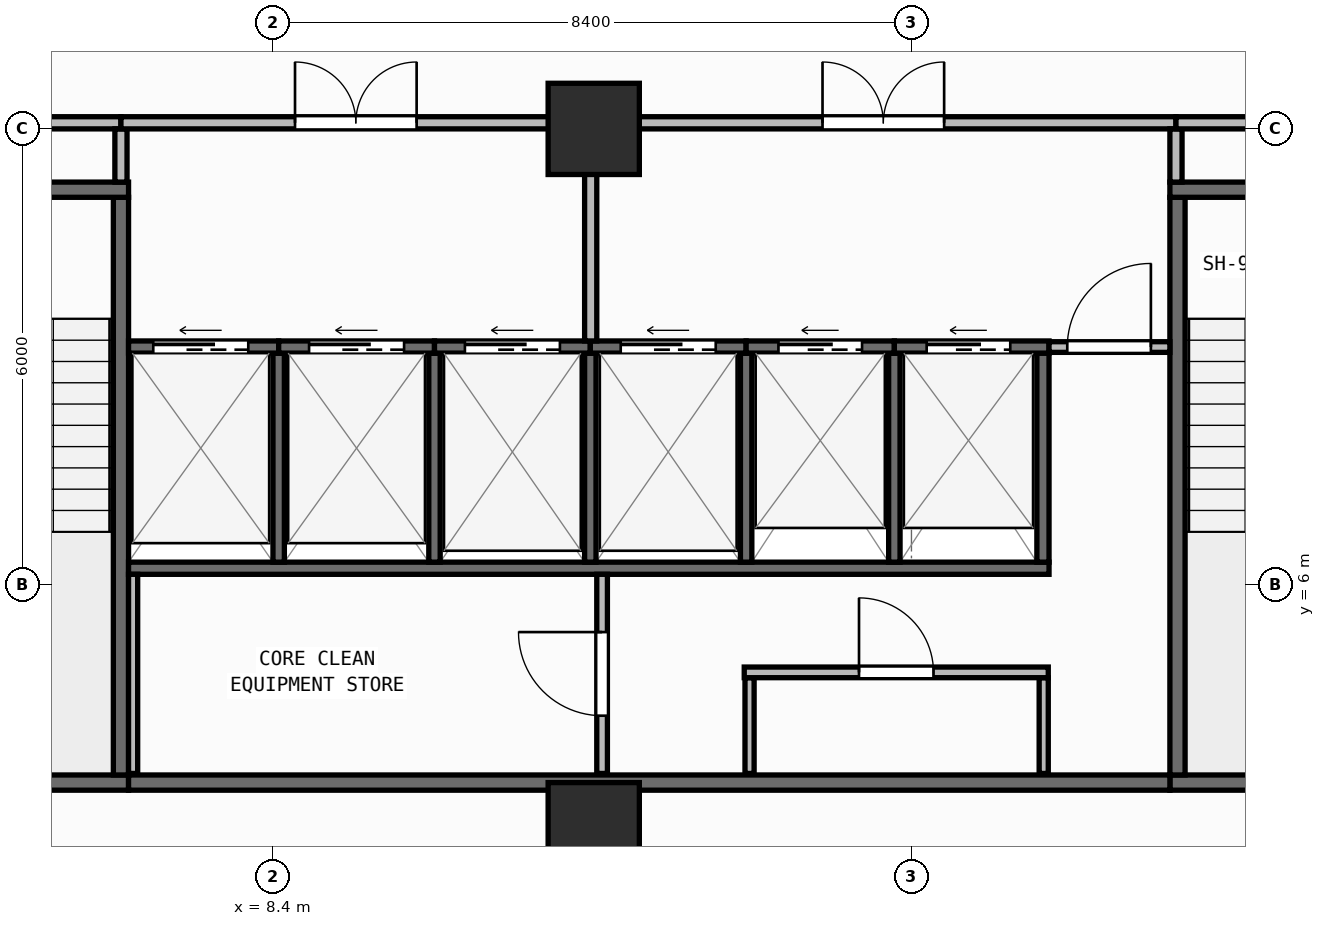
"""IFC4 building model, lengths in metres.
Left out: names, types, materials, properties, quantities, classifications, styles, units other than length and angle.
Written with IfcOpenShell. Run it as: python <this file> out.ifc"""

import sys

from ifc_helpers import new_model, si_unit, direction, frame, frame_2d, origin, origin_2d, place, context, subcontext, project, spatial, rectangle, extrude, element, fill, save


model = new_model("IFC4")
c1 = context("Model", 3, precision=1e-05, world=origin(), true_north=direction((0.0, 1.0)))
c2 = subcontext(c1, "Body", "Model", "MODEL_VIEW")
j1 = project(units=[si_unit("LENGTHUNIT", "METRE"), si_unit("PLANEANGLEUNIT", "RADIAN")], contexts=[c1])
p1 = place(None, origin())
s1 = spatial("IfcSite", under=j1, at=p1, CompositionType="ELEMENT")
p2 = place(p1, origin())
s2 = spatial("IfcBuilding", under=s1, at=p2, CompositionType="ELEMENT")
p3 = place(p2, frame((0.0, 0.0, 103.35)))
s3 = spatial("IfcBuildingStorey", under=s2, at=p3, CompositionType="ELEMENT", Elevation=103.35)
for number, where, z_axis, x_axis in (
    (1, (12.62, 2.8, 0.0), (0.0, 0.0, 1.0), (1.0, 0.0, 0.0)),
    (2, (12.62, 12.0, 0.0), (0.0, 0.0, 1.0), (1.0, 0.0, 0.0)),
):
    element("IfcColumn", number, at=place(p3, frame(where, z_axis=z_axis, x_axis=x_axis)), inside=s3, PredefinedType="COLUMN", context=c2, shape_type="SweptSolid", body=[
        extrude(rectangle(XDim=1.2, YDim=1.2, at=origin_2d()), origin(), (0.0, 0.0, 1.0), 3.95),
    ])
p4 = place(p3, frame((2.76, 0.173, 0.0), z_axis=(0.0, 0.0, 1.0), x_axis=(0.996857931723, 0.079210251617, 0.0)))
e3 = element("IfcWall", 3, at=p4, inside=s3, PredefinedType="STANDARD", context=c2, shape_type="SweptSolid", body=[
    extrude(rectangle(XDim=51.442, YDim=0.26, at=frame_2d((25.721, 0.0))), origin(), (0.0, 0.0, 1.0), 3.71),
])
p5 = place(p4, frame((24.521, 0.0, 0.9)))
e4 = element("IfcOpeningElement", 4, at=p5, cuts=e3, PredefinedType="OPENING", context=c2, shape_type="SweptSolid", body=[
    extrude(rectangle(XDim=2.4, YDim=1.65, at=frame_2d((1.2, 0.825))), frame((0.0, 0.14, 0.0), z_axis=(0.0, -1.0, 0.0), x_axis=(1.0, 0.0, 0.0)), (0.0, 0.0, 1.0), 0.28),
])
p6 = place(p3, frame((2.8, 3.4, 0.0), z_axis=(0.0, 0.0, 1.0), x_axis=(1.0, 0.0, 0.0)))
e5 = element("IfcWall", 5, at=p6, inside=s3, PredefinedType="SHEAR", context=c2, shape_type="SweptSolid", body=[
    extrude(rectangle(XDim=3.7, YDim=0.2, at=frame_2d((1.85, 0.0))), origin(), (0.0, 0.0, 1.0), 3.71),
])
p7 = place(p3, frame((6.4, 3.5, 0.0), z_axis=(0.0, 0.0, 1.0), x_axis=(0.0, 1.0, 0.0)))
e6 = element("IfcWall", 6, at=p7, inside=s3, PredefinedType="SHEAR", context=c2, shape_type="SweptSolid", body=[
    extrude(rectangle(XDim=7.6, YDim=0.2, at=frame_2d((3.8, 0.0))), origin(), (0.0, 0.0, 1.0), 3.71),
])
p8 = place(p3, frame((2.8, 11.2, 0.0), z_axis=(0.0, 0.0, 1.0), x_axis=(1.0, 0.0, 0.0)))
e7 = element("IfcWall", 7, at=p8, inside=s3, PredefinedType="SHEAR", context=c2, shape_type="SweptSolid", body=[
    extrude(rectangle(XDim=3.7, YDim=0.2, at=frame_2d((1.85, 0.0))), origin(), (0.0, 0.0, 1.0), 3.71),
])
p9 = place(p8, frame((1.2, 0.0, 0.0)))
e8 = element("IfcOpeningElement", 8, at=p9, cuts=e7, PredefinedType="OPENING", context=c2, shape_type="SweptSolid", body=[
    extrude(rectangle(XDim=1.3, YDim=2.15, at=frame_2d((0.65, 1.075))), frame((0.0, 0.11, 0.0), z_axis=(0.0, -1.0, 0.0), x_axis=(1.0, 0.0, 0.0)), (0.0, 0.0, 1.0), 0.22),
])
p10 = place(p3, frame((20.2, 3.4, 0.0), z_axis=(0.0, 0.0, 1.0), x_axis=(1.0, 0.0, 0.0)))
e9 = element("IfcWall", 9, at=p10, inside=s3, PredefinedType="SHEAR", context=c2, shape_type="SweptSolid", body=[
    extrude(rectangle(XDim=3.7, YDim=0.2, at=frame_2d((1.85, 0.0))), origin(), (0.0, 0.0, 1.0), 3.71),
])
p11 = place(p3, frame((20.3, 3.5, 0.0), z_axis=(0.0, 0.0, 1.0), x_axis=(0.0, 1.0, 0.0)))
e10 = element("IfcWall", 10, at=p11, inside=s3, PredefinedType="SHEAR", context=c2, shape_type="SweptSolid", body=[
    extrude(rectangle(XDim=7.6, YDim=0.2, at=frame_2d((3.8, 0.0))), origin(), (0.0, 0.0, 1.0), 3.71),
])
p12 = place(p3, frame((20.2, 11.2, 0.0), z_axis=(0.0, 0.0, 1.0), x_axis=(1.0, 0.0, 0.0)))
e11 = element("IfcWall", 11, at=p12, inside=s3, PredefinedType="SHEAR", context=c2, shape_type="SweptSolid", body=[
    extrude(rectangle(XDim=3.7, YDim=0.2, at=frame_2d((1.85, 0.0))), origin(), (0.0, 0.0, 1.0), 3.71),
])
p13 = place(p12, frame((1.2, 0.0, 0.0)))
e12 = element("IfcOpeningElement", 12, at=p13, cuts=e11, PredefinedType="OPENING", context=c2, shape_type="SweptSolid", body=[
    extrude(rectangle(XDim=1.3, YDim=2.15, at=frame_2d((0.65, 1.075))), frame((0.0, 0.11, 0.0), z_axis=(0.0, -1.0, 0.0), x_axis=(1.0, 0.0, 0.0)), (0.0, 0.0, 1.0), 0.22),
])
p14 = place(p3, frame((6.5, 3.4, 0.0), z_axis=(0.0, 0.0, 1.0), x_axis=(1.0, 0.0, 0.0)))
e13 = element("IfcWall", 13, at=p14, inside=s3, PredefinedType="SHEAR", context=c2, shape_type="SweptSolid", body=[
    extrude(rectangle(XDim=13.7, YDim=0.2, at=frame_2d((6.85, 0.0))), origin(), (0.0, 0.0, 1.0), 3.71),
])
p15 = place(p3, frame((6.5, 6.22, 0.0), z_axis=(0.0, 0.0, 1.0), x_axis=(1.0, 0.0, 0.0)))
e14 = element("IfcWall", 14, at=p15, inside=s3, PredefinedType="SHEAR", context=c2, shape_type="SweptSolid", body=[
    extrude(rectangle(XDim=12.11, YDim=0.16, at=frame_2d((6.055, 0.0))), origin(), (0.0, 0.0, 1.0), 3.71),
])
p16 = place(p3, frame((18.53, 6.3, 0.0), z_axis=(0.0, 0.0, 1.0), x_axis=(0.0, 1.0, 0.0)))
e15 = element("IfcWall", 15, at=p16, inside=s3, PredefinedType="SHEAR", context=c2, shape_type="SweptSolid", body=[
    extrude(rectangle(XDim=2.75, YDim=0.16, at=frame_2d((1.375, 0.0))), origin(), (0.0, 0.0, 1.0), 3.71),
])
for number, where, z_axis, x_axis in (
    (16, (8.475, 6.3, 0.0), (0.0, 0.0, 1.0), (0.0, 1.0, 0.0)),
    (17, (10.525, 6.3, 0.0), (0.0, 0.0, 1.0), (0.0, 1.0, 0.0)),
    (18, (12.575, 6.3, 0.0), (0.0, 0.0, 1.0), (0.0, 1.0, 0.0)),
    (19, (14.625, 6.3, 0.0), (0.0, 0.0, 1.0), (0.0, 1.0, 0.0)),
    (20, (16.575, 6.3, 0.0), (0.0, 0.0, 1.0), (0.0, 1.0, 0.0)),
):
    element("IfcWall", number, at=place(p3, frame(where, z_axis=z_axis, x_axis=x_axis)), inside=s3, PredefinedType="SHEAR", context=c2, shape_type="SweptSolid", body=[
        extrude(rectangle(XDim=2.75, YDim=0.15, at=frame_2d((1.375, 0.0))), origin(), (0.0, 0.0, 1.0), 3.71),
    ])
p17 = place(p3, frame((6.5, 9.13, 0.0), z_axis=(0.0, 0.0, 1.0), x_axis=(1.0, 0.0, 0.0)))
e21 = element("IfcWall", 21, at=p17, inside=s3, PredefinedType="SHEAR", context=c2, shape_type="SweptSolid", body=[
    extrude(rectangle(XDim=1.975, YDim=0.16, at=frame_2d((0.988, 0.0))), origin(), (0.0, 0.0, 1.0), 3.71),
])
p18 = place(p17, frame((0.325, 0.0, 0.0)))
e22 = element("IfcOpeningElement", 22, at=p18, cuts=e21, PredefinedType="OPENING", context=c2, shape_type="SweptSolid", body=[
    extrude(rectangle(XDim=1.25, YDim=2.15, at=frame_2d((0.625, 1.075))), frame((0.0, 0.09, 0.0), z_axis=(0.0, -1.0, 0.0), x_axis=(1.0, 0.0, 0.0)), (0.0, 0.0, 1.0), 0.18),
])
p19 = place(p3, frame((8.475, 9.13, 0.0), z_axis=(0.0, 0.0, 1.0), x_axis=(1.0, 0.0, 0.0)))
e23 = element("IfcWall", 23, at=p19, inside=s3, PredefinedType="SHEAR", context=c2, shape_type="SweptSolid", body=[
    extrude(rectangle(XDim=2.05, YDim=0.16, at=frame_2d((1.025, 0.0))), origin(), (0.0, 0.0, 1.0), 3.71),
])
p20 = place(p19, frame((0.4, 0.0, 0.0)))
e24 = element("IfcOpeningElement", 24, at=p20, cuts=e23, PredefinedType="OPENING", context=c2, shape_type="SweptSolid", body=[
    extrude(rectangle(XDim=1.25, YDim=2.15, at=frame_2d((0.625, 1.075))), frame((0.0, 0.09, 0.0), z_axis=(0.0, -1.0, 0.0), x_axis=(1.0, 0.0, 0.0)), (0.0, 0.0, 1.0), 0.18),
])
p21 = place(p3, frame((10.525, 9.13, 0.0), z_axis=(0.0, 0.0, 1.0), x_axis=(1.0, 0.0, 0.0)))
e25 = element("IfcWall", 25, at=p21, inside=s3, PredefinedType="SHEAR", context=c2, shape_type="SweptSolid", body=[
    extrude(rectangle(XDim=2.05, YDim=0.16, at=frame_2d((1.025, 0.0))), origin(), (0.0, 0.0, 1.0), 3.71),
])
p22 = place(p21, frame((0.4, 0.0, 0.0)))
e26 = element("IfcOpeningElement", 26, at=p22, cuts=e25, PredefinedType="OPENING", context=c2, shape_type="SweptSolid", body=[
    extrude(rectangle(XDim=1.25, YDim=2.15, at=frame_2d((0.625, 1.075))), frame((0.0, 0.09, 0.0), z_axis=(0.0, -1.0, 0.0), x_axis=(1.0, 0.0, 0.0)), (0.0, 0.0, 1.0), 0.18),
])
p23 = place(p3, frame((12.575, 9.13, 0.0), z_axis=(0.0, 0.0, 1.0), x_axis=(1.0, 0.0, 0.0)))
e27 = element("IfcWall", 27, at=p23, inside=s3, PredefinedType="SHEAR", context=c2, shape_type="SweptSolid", body=[
    extrude(rectangle(XDim=2.05, YDim=0.16, at=frame_2d((1.025, 0.0))), origin(), (0.0, 0.0, 1.0), 3.71),
])
p24 = place(p23, frame((0.4, 0.0, 0.0)))
e28 = element("IfcOpeningElement", 28, at=p24, cuts=e27, PredefinedType="OPENING", context=c2, shape_type="SweptSolid", body=[
    extrude(rectangle(XDim=1.25, YDim=2.15, at=frame_2d((0.625, 1.075))), frame((0.0, 0.09, 0.0), z_axis=(0.0, -1.0, 0.0), x_axis=(1.0, 0.0, 0.0)), (0.0, 0.0, 1.0), 0.18),
])
p25 = place(p3, frame((14.625, 9.13, 0.0), z_axis=(0.0, 0.0, 1.0), x_axis=(1.0, 0.0, 0.0)))
e29 = element("IfcWall", 29, at=p25, inside=s3, PredefinedType="SHEAR", context=c2, shape_type="SweptSolid", body=[
    extrude(rectangle(XDim=1.95, YDim=0.16, at=frame_2d((0.975, 0.0))), origin(), (0.0, 0.0, 1.0), 3.71),
])
p26 = place(p25, frame((0.425, 0.0, 0.0)))
e30 = element("IfcOpeningElement", 30, at=p26, cuts=e29, PredefinedType="OPENING", context=c2, shape_type="SweptSolid", body=[
    extrude(rectangle(XDim=1.1, YDim=2.15, at=frame_2d((0.55, 1.075))), frame((0.0, 0.09, 0.0), z_axis=(0.0, -1.0, 0.0), x_axis=(1.0, 0.0, 0.0)), (0.0, 0.0, 1.0), 0.18),
])
p27 = place(p3, frame((16.575, 9.13, 0.0), z_axis=(0.0, 0.0, 1.0), x_axis=(1.0, 0.0, 0.0)))
e31 = element("IfcWall", 31, at=p27, inside=s3, PredefinedType="SHEAR", context=c2, shape_type="SweptSolid", body=[
    extrude(rectangle(XDim=2.035, YDim=0.16, at=frame_2d((1.018, 0.0))), origin(), (0.0, 0.0, 1.0), 3.71),
])
p28 = place(p27, frame((0.425, 0.0, 0.0)))
e32 = element("IfcOpeningElement", 32, at=p28, cuts=e31, PredefinedType="OPENING", context=c2, shape_type="SweptSolid", body=[
    extrude(rectangle(XDim=1.1, YDim=2.15, at=frame_2d((0.55, 1.075))), frame((0.0, 0.09, 0.0), z_axis=(0.0, -1.0, 0.0), x_axis=(1.0, 0.0, 0.0)), (0.0, 0.0, 1.0), 0.18),
])
p29 = place(p3, frame((6.56, 3.52, 0.0), z_axis=(0.0, 0.0, 1.0), x_axis=(0.0, 1.0, 0.0)))
e33 = element("IfcWall", 33, at=p29, inside=s3, PredefinedType="PARTITIONING", context=c2, shape_type="SweptSolid", body=[
    extrude(rectangle(XDim=2.62, YDim=0.12, at=frame_2d((1.31, 0.0))), origin(), (0.0, 0.0, 1.0), 3.71),
])
p30 = place(p3, frame((12.73, 3.52, 0.0), z_axis=(0.0, 0.0, 1.0), x_axis=(0.0, 1.0, 0.0)))
e34 = element("IfcWall", 34, at=p30, inside=s3, PredefinedType="PARTITIONING", context=c2, shape_type="SweptSolid", body=[
    extrude(rectangle(XDim=2.62, YDim=0.14, at=frame_2d((1.31, 0.0))), origin(), (0.0, 0.0, 1.0), 3.71),
])
p31 = place(p30, frame((0.76, 0.0, 0.0)))
e35 = element("IfcOpeningElement", 35, at=p31, cuts=e34, PredefinedType="OPENING", context=c2, shape_type="SweptSolid", body=[
    extrude(rectangle(XDim=1.1, YDim=2.1, at=frame_2d((0.55, 1.05))), frame((0.0, 0.08, 0.0), z_axis=(0.0, -1.0, 0.0), x_axis=(1.0, 0.0, 0.0)), (0.0, 0.0, 1.0), 0.16),
])
for number, where, z_axis, x_axis in (
    (36, (14.67, 3.52, 0.0), (0.0, 0.0, 1.0), (0.0, 1.0, 0.0)),
    (37, (18.54, 3.52, 0.0), (0.0, 0.0, 1.0), (0.0, 1.0, 0.0)),
):
    element("IfcWall", number, at=place(p3, frame(where, z_axis=z_axis, x_axis=x_axis)), inside=s3, PredefinedType="PARTITIONING", context=c2, shape_type="SweptSolid", body=[
        extrude(rectangle(XDim=1.26, YDim=0.12, at=frame_2d((0.63, 0.0))), origin(), (0.0, 0.0, 1.0), 3.71),
    ])
p32 = place(p3, frame((14.6, 4.85, 0.0), z_axis=(0.0, 0.0, 1.0), x_axis=(1.0, 0.0, 0.0)))
e38 = element("IfcWall", 38, at=p32, inside=s3, PredefinedType="PARTITIONING", context=c2, shape_type="SweptSolid", body=[
    extrude(rectangle(XDim=4.0, YDim=0.14, at=frame_2d((2.0, 0.0))), origin(), (0.0, 0.0, 1.0), 3.71),
])
p33 = place(p32, frame((1.51, 0.0, 0.0)))
e39 = element("IfcOpeningElement", 39, at=p33, cuts=e38, PredefinedType="OPENING", context=c2, shape_type="SweptSolid", body=[
    extrude(rectangle(XDim=0.98, YDim=2.1, at=frame_2d((0.49, 1.05))), frame((0.0, 0.08, 0.0), z_axis=(0.0, -1.0, 0.0), x_axis=(1.0, 0.0, 0.0)), (0.0, 0.0, 1.0), 0.16),
])
p34 = place(p3, frame((18.61, 9.13, 0.0), z_axis=(0.0, 0.0, 1.0), x_axis=(1.0, 0.0, 0.0)))
e40 = element("IfcWall", 40, at=p34, inside=s3, PredefinedType="PARTITIONING", context=c2, shape_type="SweptSolid", body=[
    extrude(rectangle(XDim=1.59, YDim=0.14, at=frame_2d((0.795, 0.0))), origin(), (0.0, 0.0, 1.0), 3.71),
])
p35 = place(p34, frame((0.24, 0.0, 0.0)))
e41 = element("IfcOpeningElement", 41, at=p35, cuts=e40, PredefinedType="OPENING", context=c2, shape_type="SweptSolid", body=[
    extrude(rectangle(XDim=1.1, YDim=2.1, at=frame_2d((0.55, 1.05))), frame((0.0, 0.08, 0.0), z_axis=(0.0, -1.0, 0.0), x_axis=(1.0, 0.0, 0.0)), (0.0, 0.0, 1.0), 0.16),
])
p36 = place(p3, frame((2.8, 12.08, 0.0), z_axis=(0.0, 0.0, 1.0), x_axis=(1.0, 0.0, 0.0)))
e42 = element("IfcWall", 42, at=p36, inside=s3, PredefinedType="PARTITIONING", context=c2, shape_type="SweptSolid", body=[
    extrude(rectangle(XDim=3.6, YDim=0.16, at=frame_2d((1.8, 0.0))), origin(), (0.0, 0.0, 1.0), 3.083),
])
p37 = place(p36, frame((1.0, 0.0, 0.0)))
e43 = element("IfcOpeningElement", 43, at=p37, cuts=e42, PredefinedType="OPENING", context=c2, shape_type="SweptSolid", body=[
    extrude(rectangle(XDim=1.6, YDim=2.05, at=frame_2d((0.8, 1.025))), frame((0.0, 0.09, 0.0), z_axis=(0.0, -1.0, 0.0), x_axis=(1.0, 0.0, 0.0)), (0.0, 0.0, 1.0), 0.18),
])
p38 = place(p3, frame((6.4, 11.3, 0.0), z_axis=(0.0, 0.0, 1.0), x_axis=(0.0, 1.0, 0.0)))
e44 = element("IfcWall", 44, at=p38, inside=s3, PredefinedType="PARTITIONING", context=c2, shape_type="SweptSolid", body=[
    extrude(rectangle(XDim=0.7, YDim=0.16, at=frame_2d((0.35, 0.0))), origin(), (0.0, 0.0, 1.0), 3.71),
])
p39 = place(p3, frame((6.4, 12.08, 0.0), z_axis=(0.0, 0.0, 1.0), x_axis=(1.0, 0.0, 0.0)))
e45 = element("IfcWall", 45, at=p39, inside=s3, PredefinedType="PARTITIONING", context=c2, shape_type="SweptSolid", body=[
    extrude(rectangle(XDim=6.18, YDim=0.16, at=frame_2d((3.09, 0.0))), origin(), (0.0, 0.0, 1.0), 3.083),
])
p40 = place(p39, frame((2.29, 0.0, 0.0)))
e46 = element("IfcOpeningElement", 46, at=p40, cuts=e45, PredefinedType="OPENING", context=c2, shape_type="SweptSolid", body=[
    extrude(rectangle(XDim=1.6, YDim=2.05, at=frame_2d((0.8, 1.025))), frame((0.0, 0.09, 0.0), z_axis=(0.0, -1.0, 0.0), x_axis=(1.0, 0.0, 0.0)), (0.0, 0.0, 1.0), 0.18),
])
p41 = place(p3, frame((12.58, 9.21, 0.0), z_axis=(0.0, 0.0, 1.0), x_axis=(0.0, 1.0, 0.0)))
e47 = element("IfcWall", 47, at=p41, inside=s3, PredefinedType="PARTITIONING", context=c2, shape_type="SweptSolid", body=[
    extrude(rectangle(XDim=2.79, YDim=0.16, at=frame_2d((1.395, 0.0))), origin(), (0.0, 0.0, 1.0), 3.71),
])
p42 = place(p3, frame((12.58, 12.08, 0.0), z_axis=(0.0, 0.0, 1.0), x_axis=(1.0, 0.0, 0.0)))
e48 = element("IfcWall", 48, at=p42, inside=s3, PredefinedType="PARTITIONING", context=c2, shape_type="SweptSolid", body=[
    extrude(rectangle(XDim=7.7, YDim=0.16, at=frame_2d((3.85, 0.0))), origin(), (0.0, 0.0, 1.0), 3.083),
])
p43 = place(p42, frame((3.05, 0.0, 0.0)))
e49 = element("IfcOpeningElement", 49, at=p43, cuts=e48, PredefinedType="OPENING", context=c2, shape_type="SweptSolid", body=[
    extrude(rectangle(XDim=1.6, YDim=2.05, at=frame_2d((0.8, 1.025))), frame((0.0, 0.09, 0.0), z_axis=(0.0, -1.0, 0.0), x_axis=(1.0, 0.0, 0.0)), (0.0, 0.0, 1.0), 0.18),
])
p44 = place(p3, frame((20.28, 11.3, 0.0), z_axis=(0.0, 0.0, 1.0), x_axis=(0.0, 1.0, 0.0)))
e50 = element("IfcWall", 50, at=p44, inside=s3, PredefinedType="PARTITIONING", context=c2, shape_type="SweptSolid", body=[
    extrude(rectangle(XDim=0.7, YDim=0.16, at=frame_2d((0.35, 0.0))), origin(), (0.0, 0.0, 1.0), 3.71),
])
p45 = place(p3, frame((20.28, 12.08, 0.0), z_axis=(0.0, 0.0, 1.0), x_axis=(1.0, 0.0, 0.0)))
e51 = element("IfcWall", 51, at=p45, inside=s3, PredefinedType="PARTITIONING", context=c2, shape_type="SweptSolid", body=[
    extrude(rectangle(XDim=3.62, YDim=0.16, at=frame_2d((1.81, 0.0))), origin(), (0.0, 0.0, 1.0), 3.083),
])
p46 = place(p45, frame((1.01, 0.0, 0.0)))
e52 = element("IfcOpeningElement", 52, at=p46, cuts=e51, PredefinedType="OPENING", context=c2, shape_type="SweptSolid", body=[
    extrude(rectangle(XDim=1.6, YDim=2.05, at=frame_2d((0.8, 1.025))), frame((0.0, 0.09, 0.0), z_axis=(0.0, -1.0, 0.0), x_axis=(1.0, 0.0, 0.0)), (0.0, 0.0, 1.0), 0.18),
])
p47 = place(p18, origin())
e53 = element("IfcDoor", 53, at=p47, inside=s3, OperationType="SLIDING_TO_LEFT", PredefinedType="DOOR", context=c2, shape_type="SweptSolid", body=[
    extrude(rectangle(XDim=1.25, YDim=2.15, at=frame_2d((0.625, 1.075))), frame((0.0, 0.025, 0.0), z_axis=(0.0, -1.0, 0.0), x_axis=(1.0, 0.0, 0.0)), (0.0, 0.0, 1.0), 0.05),
])
fill(e22, e53)
p48 = place(p20, origin())
e54 = element("IfcDoor", 54, at=p48, inside=s3, OperationType="SLIDING_TO_LEFT", PredefinedType="DOOR", context=c2, shape_type="SweptSolid", body=[
    extrude(rectangle(XDim=1.25, YDim=2.15, at=frame_2d((0.625, 1.075))), frame((0.0, 0.025, 0.0), z_axis=(0.0, -1.0, 0.0), x_axis=(1.0, 0.0, 0.0)), (0.0, 0.0, 1.0), 0.05),
])
fill(e24, e54)
p49 = place(p22, origin())
e55 = element("IfcDoor", 55, at=p49, inside=s3, OperationType="SLIDING_TO_LEFT", PredefinedType="DOOR", context=c2, shape_type="SweptSolid", body=[
    extrude(rectangle(XDim=1.25, YDim=2.15, at=frame_2d((0.625, 1.075))), frame((0.0, 0.025, 0.0), z_axis=(0.0, -1.0, 0.0), x_axis=(1.0, 0.0, 0.0)), (0.0, 0.0, 1.0), 0.05),
])
fill(e26, e55)
p50 = place(p24, origin())
e56 = element("IfcDoor", 56, at=p50, inside=s3, OperationType="SLIDING_TO_LEFT", PredefinedType="DOOR", context=c2, shape_type="SweptSolid", body=[
    extrude(rectangle(XDim=1.25, YDim=2.15, at=frame_2d((0.625, 1.075))), frame((0.0, 0.025, 0.0), z_axis=(0.0, -1.0, 0.0), x_axis=(1.0, 0.0, 0.0)), (0.0, 0.0, 1.0), 0.05),
])
fill(e28, e56)
p51 = place(p26, origin())
e57 = element("IfcDoor", 57, at=p51, inside=s3, OperationType="SLIDING_TO_LEFT", PredefinedType="DOOR", context=c2, shape_type="SweptSolid", body=[
    extrude(rectangle(XDim=1.1, YDim=2.15, at=frame_2d((0.55, 1.075))), frame((0.0, 0.025, 0.0), z_axis=(0.0, -1.0, 0.0), x_axis=(1.0, 0.0, 0.0)), (0.0, 0.0, 1.0), 0.05),
])
fill(e30, e57)
p52 = place(p28, origin())
e58 = element("IfcDoor", 58, at=p52, inside=s3, OperationType="SLIDING_TO_LEFT", PredefinedType="DOOR", context=c2, shape_type="SweptSolid", body=[
    extrude(rectangle(XDim=1.1, YDim=2.15, at=frame_2d((0.55, 1.075))), frame((0.0, 0.025, 0.0), z_axis=(0.0, -1.0, 0.0), x_axis=(1.0, 0.0, 0.0)), (0.0, 0.0, 1.0), 0.05),
])
fill(e32, e58)
p53 = place(p31, origin())
e59 = element("IfcDoor", 59, at=p53, inside=s3, OperationType="SINGLE_SWING_RIGHT", PredefinedType="DOOR", context=c2, shape_type="SweptSolid", body=[
    extrude(rectangle(XDim=1.1, YDim=2.1, at=frame_2d((0.55, 1.05))), frame((0.0, 0.025, 0.0), z_axis=(0.0, -1.0, 0.0), x_axis=(1.0, 0.0, 0.0)), (0.0, 0.0, 1.0), 0.05),
])
fill(e35, e59)
p54 = place(p33, origin())
e60 = element("IfcDoor", 60, at=p54, inside=s3, OperationType="SINGLE_SWING_LEFT", PredefinedType="DOOR", context=c2, shape_type="SweptSolid", body=[
    extrude(rectangle(XDim=0.98, YDim=2.1, at=frame_2d((0.49, 1.05))), frame((0.0, 0.025, 0.0), z_axis=(0.0, -1.0, 0.0), x_axis=(1.0, 0.0, 0.0)), (0.0, 0.0, 1.0), 0.05),
])
fill(e39, e60)
p55 = place(p35, origin())
e61 = element("IfcDoor", 61, at=p55, inside=s3, OperationType="SINGLE_SWING_RIGHT", PredefinedType="DOOR", context=c2, shape_type="SweptSolid", body=[
    extrude(rectangle(XDim=1.1, YDim=2.1, at=frame_2d((0.55, 1.05))), frame((0.0, 0.025, 0.0), z_axis=(0.0, -1.0, 0.0), x_axis=(1.0, 0.0, 0.0)), (0.0, 0.0, 1.0), 0.05),
])
fill(e41, e61)
p56 = place(p40, origin())
e62 = element("IfcDoor", 62, at=p56, inside=s3, OperationType="DOUBLE_DOOR_SINGLE_SWING", PredefinedType="DOOR", context=c2, shape_type="SweptSolid", body=[
    extrude(rectangle(XDim=1.6, YDim=2.05, at=frame_2d((0.8, 1.025))), frame((0.0, 0.025, 0.0), z_axis=(0.0, -1.0, 0.0), x_axis=(1.0, 0.0, 0.0)), (0.0, 0.0, 1.0), 0.05),
])
fill(e46, e62)
p57 = place(p43, origin())
e63 = element("IfcDoor", 63, at=p57, inside=s3, OperationType="DOUBLE_DOOR_SINGLE_SWING", PredefinedType="DOOR", context=c2, shape_type="SweptSolid", body=[
    extrude(rectangle(XDim=1.6, YDim=2.05, at=frame_2d((0.8, 1.025))), frame((0.0, 0.025, 0.0), z_axis=(0.0, -1.0, 0.0), x_axis=(1.0, 0.0, 0.0)), (0.0, 0.0, 1.0), 0.05),
])
fill(e49, e63)
save(model, sys.argv[1])
